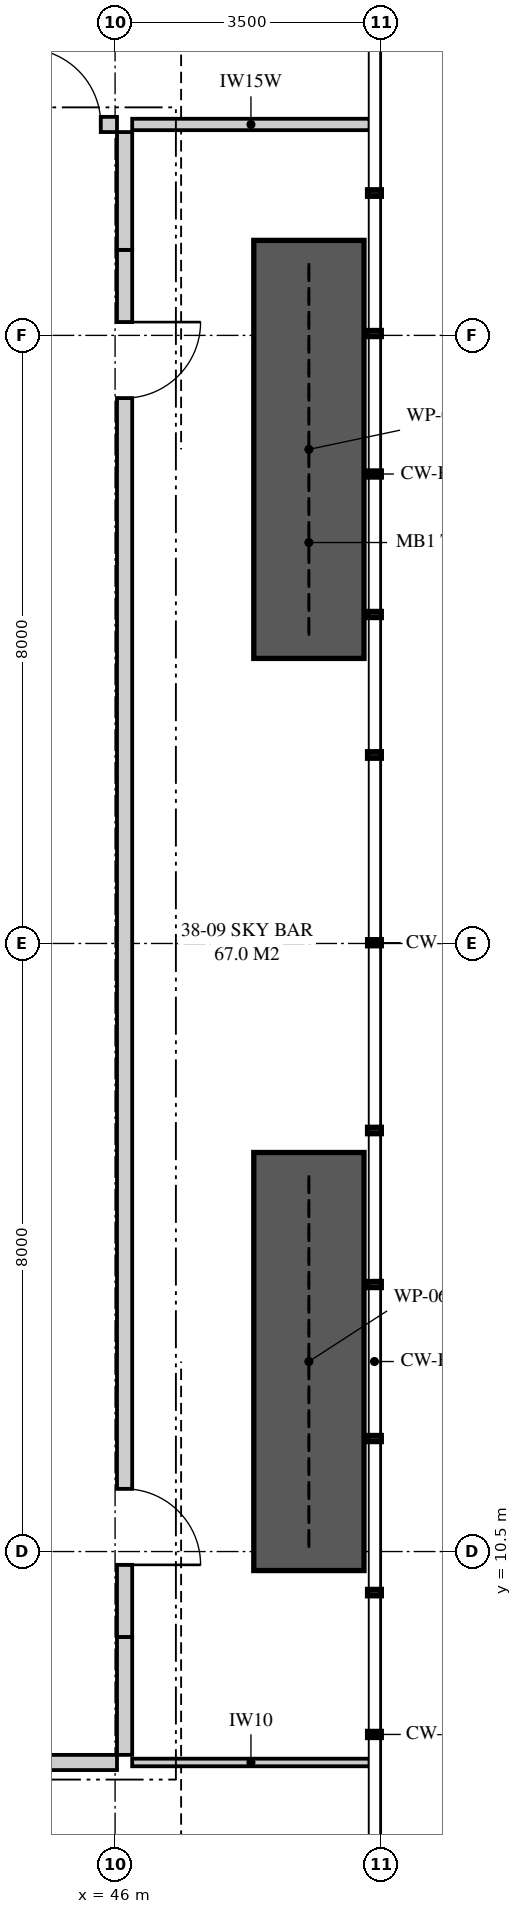
"""IFC4 building model, lengths in metres.
Left out: names, types, materials, properties, quantities, classifications, styles, units other than length and angle.
Written with IfcOpenShell. Run it as: python <this file> out.ifc"""

import sys

from ifc_helpers import new_model, si_unit, direction, frame, frame_2d, origin, place, context, subcontext, project, spatial, polyline, rectangle, outline, extrude, element, fill, save


model = new_model("IFC4")
c1 = context("Model", 3, precision=1e-05, world=origin(), true_north=direction((0.0, 1.0)))
c2 = subcontext(c1, "Body", "Model", "MODEL_VIEW")
j1 = project(units=[si_unit("LENGTHUNIT", "METRE"), si_unit("PLANEANGLEUNIT", "RADIAN")], contexts=[c1])
p1 = place(None, origin())
s1 = spatial("IfcSite", under=j1, at=p1, CompositionType="ELEMENT")
p2 = place(p1, origin())
s2 = spatial("IfcBuilding", under=s1, at=p2, CompositionType="ELEMENT")
p3 = place(p2, frame((0.0, 0.0, 138.35)))
s3 = spatial("IfcBuildingStorey", under=s2, at=p3, CompositionType="ELEMENT", Elevation=138.35)
p4 = place(p3, frame((32.15, 7.725, 0.0), z_axis=(0.0, 0.0, 1.0), x_axis=(1.0, 0.0, 0.0)))
e1 = element("IfcWall", 1, at=p4, inside=s3, PredefinedType="PARTITIONING", context=c2, shape_type="SweptSolid", body=[
    extrude(outline(polyline([(0.0, 0.0), (13.875, 0.0), (13.875, 5.72), (10.662, 5.72), (10.662, 5.141), (9.859, 5.141), (9.859, 5.72), (7.185, 5.72), (7.185, 5.12), (5.765, 5.12), (5.765, 5.72), (1.939, 5.72), (1.939, 5.141), (1.135, 5.141), (1.135, 5.72), (0.0, 5.72), (0.0, 0.0)])), frame((0.0, 0.1, 0.0), z_axis=(0.0, -1.0, 0.0), x_axis=(1.0, 0.0, 0.0)), (0.0, 0.0, 1.0), 0.2),
])
p5 = place(p4, frame((6.462, 0.0, 0.0)))
e2 = element("IfcOpeningElement", 2, at=p5, cuts=e1, PredefinedType="OPENING", context=c2, shape_type="SweptSolid", body=[
    extrude(rectangle(XDim=1.0, YDim=2.1, at=frame_2d((0.5, 1.05))), frame((0.0, 0.11, 0.0), z_axis=(0.0, -1.0, 0.0), x_axis=(1.0, 0.0, 0.0)), (0.0, 0.0, 1.0), 0.22),
])
p6 = place(p3, frame((46.125, 7.825, 0.0), z_axis=(0.0, 0.0, 1.0), x_axis=(0.0, 1.0, 0.0)))
e3 = element("IfcWall", 3, at=p6, inside=s3, PredefinedType="PARTITIONING", context=c2, shape_type="SweptSolid", body=[
    extrude(rectangle(XDim=1.55, YDim=0.2, at=frame_2d((0.775, 0.0))), origin(), (0.0, 0.0, 1.0), 5.72),
])
p7 = place(p3, frame((44.573, 29.275, 0.0), z_axis=(0.0, 0.0, 1.0), x_axis=(1.0, 0.0, 0.0)))
e4 = element("IfcWall", 4, at=p7, inside=s3, PredefinedType="PARTITIONING", context=c2, shape_type="SweptSolid", body=[
    extrude(rectangle(XDim=1.452, YDim=0.2, at=frame_2d((0.726, 0.0))), origin(), (0.0, 0.0, 1.0), 5.72),
])
p8 = place(p7, frame((0.239, 0.0, 0.0)))
e5 = element("IfcOpeningElement", 5, at=p8, cuts=e4, PredefinedType="OPENING", context=c2, shape_type="SweptSolid", body=[
    extrude(rectangle(XDim=1.0, YDim=2.1, at=frame_2d((0.5, 1.05))), frame((0.0, 0.11, 0.0), z_axis=(0.0, -1.0, 0.0), x_axis=(1.0, 0.0, 0.0)), (0.0, 0.0, 1.0), 0.22),
])
p9 = place(p3, frame((46.125, 27.625, 0.0), z_axis=(0.0, 0.0, 1.0), x_axis=(0.0, 1.0, 0.0)))
e6 = element("IfcWall", 6, at=p9, inside=s3, PredefinedType="PARTITIONING", context=c2, shape_type="SweptSolid", body=[
    extrude(rectangle(XDim=1.55, YDim=0.2, at=frame_2d((0.775, 0.0))), origin(), (0.0, 0.0, 1.0), 5.72),
])
p10 = place(p3, frame((46.125, 9.375, 0.0), z_axis=(0.0, 0.0, 1.0), x_axis=(0.0, 1.0, 0.0)))
e7 = element("IfcWall", 7, at=p10, inside=s3, PredefinedType="PARTITIONING", context=c2, shape_type="SweptSolid", body=[
    extrude(outline(polyline([(0.0, 0.0), (18.25, 0.0), (18.25, 5.72), (15.975, 5.72), (15.975, 5.02), (15.275, 5.02), (15.275, 5.72), (3.975, 5.72), (3.975, 5.02), (3.275, 5.02), (3.275, 5.72), (0.0, 5.72), (0.0, 0.0)])), frame((0.0, 0.1, 0.0), z_axis=(0.0, -1.0, 0.0), x_axis=(1.0, 0.0, 0.0)), (0.0, 0.0, 1.0), 0.2),
])
p11 = place(p10, frame((0.95, 0.0, 0.0)))
e8 = element("IfcOpeningElement", 8, at=p11, cuts=e7, PredefinedType="OPENING", context=c2, shape_type="SweptSolid", body=[
    extrude(rectangle(XDim=1.0, YDim=2.1, at=frame_2d((0.5, 1.05))), frame((0.0, 0.11, 0.0), z_axis=(0.0, -1.0, 0.0), x_axis=(1.0, 0.0, 0.0)), (0.0, 0.0, 1.0), 0.22),
])
p12 = place(p10, frame((16.3, 0.0, 0.0)))
e9 = element("IfcOpeningElement", 9, at=p12, cuts=e7, PredefinedType="OPENING", context=c2, shape_type="SweptSolid", body=[
    extrude(rectangle(XDim=1.0, YDim=2.1, at=frame_2d((0.5, 1.05))), frame((0.0, 0.11, 0.0), z_axis=(0.0, -1.0, 0.0), x_axis=(1.0, 0.0, 0.0)), (0.0, 0.0, 1.0), 0.22),
])
p13 = place(p3, frame((46.225, 7.725, 0.0), z_axis=(0.0, 0.0, 1.0), x_axis=(1.0, 0.0, 0.0)))
e10 = element("IfcWall", 10, at=p13, inside=s3, PredefinedType="PARTITIONING", context=c2, shape_type="SweptSolid", body=[
    extrude(outline(polyline([(0.0, 0.0), (3.125, 0.0), (3.125, 5.72), (2.187, 5.72), (2.187, 4.32), (0.752, 4.32), (0.752, 5.12), (0.0, 5.12), (0.0, 0.0)])), frame((0.0, 0.05, 0.0), z_axis=(0.0, -1.0, 0.0), x_axis=(1.0, 0.0, 0.0)), (0.0, 0.0, 1.0), 0.1),
])
p14 = place(p3, frame((46.225, 29.275, 0.0), z_axis=(0.0, 0.0, 1.0), x_axis=(1.0, 0.0, 0.0)))
e11 = element("IfcWall", 11, at=p14, inside=s3, PredefinedType="PLUMBINGWALL", context=c2, shape_type="SweptSolid", body=[
    extrude(outline(polyline([(0.0, 0.0), (3.125, 0.0), (3.125, 5.72), (2.353, 5.72), (2.353, 4.32), (0.91, 4.32), (0.91, 5.12), (0.0, 5.12), (0.0, 0.0)])), frame((0.0, 0.075, 0.0), z_axis=(0.0, -1.0, 0.0), x_axis=(1.0, 0.0, 0.0)), (0.0, 0.0, 1.0), 0.15),
])
for number, where, z_axis, x_axis in (
    (12, (48.55, 10.25, 0.0), (0.0, 0.0, 1.0), (0.0, 1.0, 0.0)),
    (13, (48.55, 22.25, 0.0), (0.0, 0.0, 1.0), (0.0, 1.0, 0.0)),
):
    element("IfcWall", number, at=place(p3, frame(where, z_axis=z_axis, x_axis=x_axis)), inside=s3, PredefinedType="SHEAR", context=c2, shape_type="SweptSolid", body=[
        extrude(rectangle(XDim=5.5, YDim=1.45, at=frame_2d((2.75, 0.0))), origin(), (0.0, 0.0, 1.0), 6.0),
    ])
p15 = place(p8, origin())
e14 = element("IfcDoor", 14, at=p15, inside=s3, OperationType="SINGLE_SWING_LEFT", PredefinedType="DOOR", context=c2, shape_type="SweptSolid", body=[
    extrude(rectangle(XDim=1.0, YDim=2.1, at=frame_2d((0.5, 1.05))), frame((0.0, 0.025, 0.0), z_axis=(0.0, -1.0, 0.0), x_axis=(1.0, 0.0, 0.0)), (0.0, 0.0, 1.0), 0.05),
])
fill(e5, e14)
p16 = place(p11, frame((1.0, 0.0, 0.0), z_axis=(0.0, 0.0, 1.0), x_axis=(-1.0, 0.0, 0.0)))
e15 = element("IfcDoor", 15, at=p16, inside=s3, OperationType="SINGLE_SWING_RIGHT", PredefinedType="DOOR", context=c2, shape_type="SweptSolid", body=[
    extrude(rectangle(XDim=1.0, YDim=2.1, at=frame_2d((0.5, 1.05))), frame((0.0, 0.025, 0.0), z_axis=(0.0, -1.0, 0.0), x_axis=(1.0, 0.0, 0.0)), (0.0, 0.0, 1.0), 0.05),
])
fill(e8, e15)
p17 = place(p12, frame((1.0, 0.0, 0.0), z_axis=(0.0, 0.0, 1.0), x_axis=(-1.0, 0.0, 0.0)))
e16 = element("IfcDoor", 16, at=p17, inside=s3, OperationType="SINGLE_SWING_LEFT", PredefinedType="DOOR", context=c2, shape_type="SweptSolid", body=[
    extrude(rectangle(XDim=1.0, YDim=2.1, at=frame_2d((0.5, 1.05))), frame((0.0, 0.025, 0.0), z_axis=(0.0, -1.0, 0.0), x_axis=(1.0, 0.0, 0.0)), (0.0, 0.0, 1.0), 0.05),
])
fill(e9, e16)
save(model, sys.argv[1])
